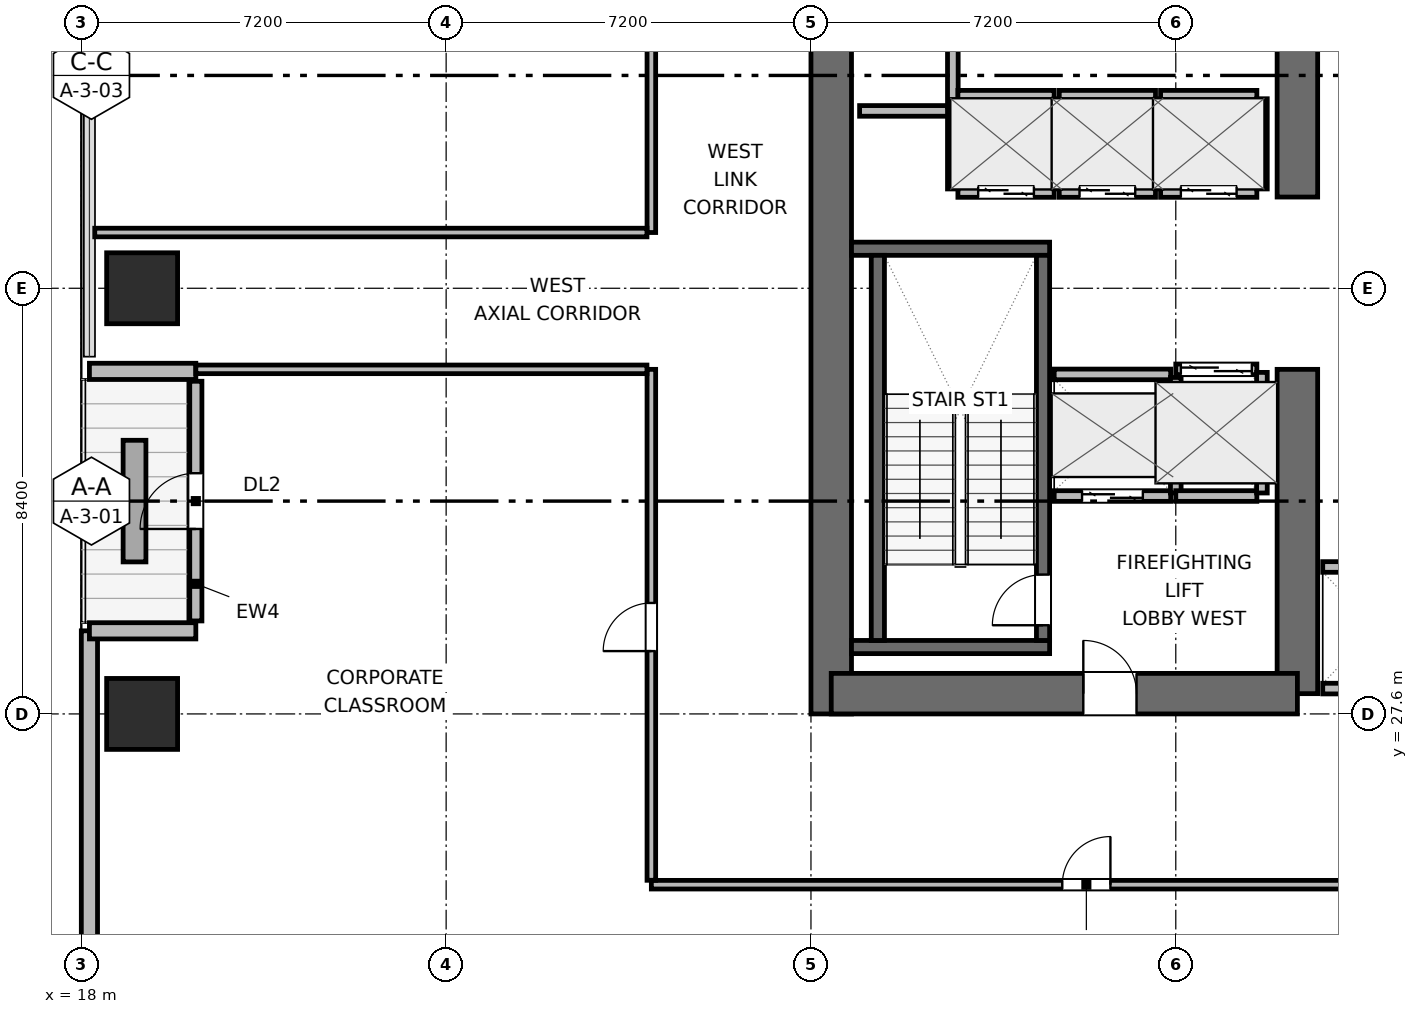
"""IFC4 building model, lengths in metres.
Left out: names, types, materials, properties, quantities, classifications, styles, units other than length and angle.
Written with IfcOpenShell. Run it as: python <this file> out.ifc"""

import sys

from ifc_helpers import new_model, si_unit, direction, frame, frame_2d, origin, origin_2d, place, context, subcontext, project, spatial, rectangle, extrude, element, fill, save


model = new_model("IFC4")
c1 = context("Model", 3, precision=1e-05, world=origin(), true_north=direction((0.0, 1.0)))
c2 = subcontext(c1, "Body", "Model", "MODEL_VIEW")
j1 = project(units=[si_unit("LENGTHUNIT", "METRE"), si_unit("PLANEANGLEUNIT", "RADIAN")], contexts=[c1])
p1 = place(None, origin())
s1 = spatial("IfcSite", under=j1, at=p1, CompositionType="ELEMENT")
p2 = place(p1, origin())
s2 = spatial("IfcBuilding", under=s1, at=p2, CompositionType="ELEMENT")
p3 = place(p2, frame((0.0, 0.0, 120.9)))
s3 = spatial("IfcBuildingStorey", under=s2, at=p3, CompositionType="ELEMENT", Elevation=120.9)
p4 = place(p3, frame((32.8, 27.6, 0.0), z_axis=(0.0, 0.0, 1.0), x_axis=(0.0, 1.0, 0.0)))
e1 = element("IfcWall", 1, at=p4, inside=s3, PredefinedType="SHEAR", context=c2, shape_type="SweptSolid", body=[
    extrude(rectangle(XDim=16.8, YDim=0.8, at=frame_2d((8.4, 0.0))), origin(), (0.0, 0.0, 1.0), 4.5),
])
p5 = place(p3, frame((42.0, 28.0, 0.0), z_axis=(0.0, 0.0, 1.0), x_axis=(0.0, 1.0, 0.0)))
e2 = element("IfcWall", 2, at=p5, inside=s3, PredefinedType="SHEAR", context=c2, shape_type="SweptSolid", body=[
    extrude(rectangle(XDim=6.4, YDim=0.8, at=frame_2d((3.2, 0.0))), origin(), (0.0, 0.0, 1.0), 4.5),
])
p6 = place(p3, frame((42.0, 37.8, 0.0), z_axis=(0.0, 0.0, 1.0), x_axis=(0.0, 1.0, 0.0)))
e3 = element("IfcWall", 3, at=p6, inside=s3, PredefinedType="SHEAR", context=c2, shape_type="SweptSolid", body=[
    extrude(rectangle(XDim=6.2, YDim=0.8, at=frame_2d((3.1, 0.0))), origin(), (0.0, 0.0, 1.0), 4.5),
])
p7 = place(p3, frame((32.8, 28.0, 0.0), z_axis=(0.0, 0.0, 1.0), x_axis=(1.0, 0.0, 0.0)))
e4 = element("IfcWall", 4, at=p7, inside=s3, PredefinedType="SHEAR", context=c2, shape_type="SweptSolid", body=[
    extrude(rectangle(XDim=9.2, YDim=0.8, at=frame_2d((4.6, 0.0))), origin(), (0.0, 0.0, 1.0), 4.5),
])
p8 = place(p7, frame((4.975, 0.0, 0.0)))
e5 = element("IfcOpeningElement", 5, at=p8, cuts=e4, PredefinedType="OPENING", context=c2, shape_type="SweptSolid", body=[
    extrude(rectangle(XDim=1.05, YDim=2.04, at=frame_2d((0.525, 1.02))), frame((0.0, 0.41, 0.0), z_axis=(0.0, -1.0, 0.0), x_axis=(1.0, 0.0, 0.0)), (0.0, 0.0, 1.0), 0.82),
])
for number, where, z_axis, x_axis in (
    (6, (33.2, 28.92, 0.0), (0.0, 0.0, 1.0), (1.0, 0.0, 0.0)),
    (7, (33.2, 36.78, 0.0), (0.0, 0.0, 1.0), (1.0, 0.0, 0.0)),
):
    element("IfcWall", number, at=place(p3, frame(where, z_axis=z_axis, x_axis=x_axis)), inside=s3, PredefinedType="SHEAR", context=c2, shape_type="SweptSolid", body=[
        extrude(rectangle(XDim=3.91, YDim=0.26, at=frame_2d((1.955, 0.0))), origin(), (0.0, 0.0, 1.0), 4.5),
    ])
p9 = place(p3, frame((33.72, 29.05, 0.0), z_axis=(0.0, 0.0, 1.0), x_axis=(0.0, 1.0, 0.0)))
e8 = element("IfcWall", 8, at=p9, inside=s3, PredefinedType="SHEAR", context=c2, shape_type="SweptSolid", body=[
    extrude(rectangle(XDim=7.6, YDim=0.26, at=frame_2d((3.8, 0.0))), origin(), (0.0, 0.0, 1.0), 4.5),
])
p10 = place(p3, frame((36.98, 29.05, 0.0), z_axis=(0.0, 0.0, 1.0), x_axis=(0.0, 1.0, 0.0)))
e9 = element("IfcWall", 9, at=p10, inside=s3, PredefinedType="SHEAR", context=c2, shape_type="SweptSolid", body=[
    extrude(rectangle(XDim=7.6, YDim=0.26, at=frame_2d((3.8, 0.0))), origin(), (0.0, 0.0, 1.0), 4.5),
])
p11 = place(p10, frame((0.3, 0.0, 0.0)))
e10 = element("IfcOpeningElement", 10, at=p11, cuts=e9, PredefinedType="OPENING", context=c2, shape_type="SweptSolid", body=[
    extrude(rectangle(XDim=1.0, YDim=2.04, at=frame_2d((0.5, 1.02))), frame((0.0, 0.14, 0.0), z_axis=(0.0, -1.0, 0.0), x_axis=(1.0, 0.0, 0.0)), (0.0, 0.0, 1.0), 0.28),
])
for number, where, z_axis, x_axis in (
    (11, (19.2, 27.6, 0.0), (0.0, 0.0, 1.0), (1.0, 0.0, 0.0)),
    (12, (19.2, 36.0, 0.0), (0.0, 0.0, 1.0), (1.0, 0.0, 0.0)),
):
    element("IfcColumn", number, at=place(p3, frame(where, z_axis=z_axis, x_axis=x_axis)), inside=s3, PredefinedType="COLUMN", context=c2, shape_type="SweptSolid", body=[
        extrude(rectangle(XDim=1.4, YDim=1.4, at=origin_2d()), origin(), (0.0, 0.0, 1.0), 4.5),
    ])
p12 = place(p3, frame((18.16, 15.021, 0.0), z_axis=(0.0, 0.0, 1.0), x_axis=(0.0, 1.0, 0.0)))
e13 = element("IfcWall", 13, at=p12, inside=s3, PredefinedType="SOLIDWALL", context=c2, shape_type="SweptSolid", body=[
    extrude(rectangle(XDim=14.219, YDim=0.32, at=frame_2d((7.109, 0.0))), origin(), (0.0, 0.0, 1.0), 4.24),
])
p13 = place(p3, frame((18.16, 29.24, 0.0), z_axis=(0.0, 0.0, 1.0), x_axis=(1.0, 0.0, 0.0)))
e14 = element("IfcWall", 14, at=p13, inside=s3, PredefinedType="SOLIDWALL", context=c2, shape_type="SweptSolid", body=[
    extrude(rectangle(XDim=2.1, YDim=0.32, at=frame_2d((1.05, 0.0))), origin(), (0.0, 0.0, 1.0), 3.475),
])
p14 = place(p3, frame((20.26, 29.435, 0.0), z_axis=(0.0, 0.0, 1.0), x_axis=(0.0, 1.0, 0.0)))
e15 = element("IfcWall", 15, at=p14, inside=s3, PredefinedType="SOLIDWALL", context=c2, shape_type="SweptSolid", body=[
    extrude(rectangle(XDim=4.73, YDim=0.24, at=frame_2d((2.365, 0.0))), origin(), (0.0, 0.0, 1.0), 3.762),
])
p15 = place(p14, frame((1.815, 0.0, 0.0)))
e16 = element("IfcOpeningElement", 16, at=p15, cuts=e15, PredefinedType="OPENING", context=c2, shape_type="SweptSolid", body=[
    extrude(rectangle(XDim=1.1, YDim=2.04, at=frame_2d((0.55, 1.02))), frame((0.0, 0.13, 0.0), z_axis=(0.0, -1.0, 0.0), x_axis=(1.0, 0.0, 0.0)), (0.0, 0.0, 1.0), 0.26),
])
p16 = place(p3, frame((20.26, 34.36, 0.0), z_axis=(0.0, 0.0, 1.0), x_axis=(-1.0, 0.0, 0.0)))
e17 = element("IfcWall", 17, at=p16, inside=s3, PredefinedType="SOLIDWALL", context=c2, shape_type="SweptSolid", body=[
    extrude(rectangle(XDim=2.1, YDim=0.32, at=frame_2d((1.05, 0.0))), origin(), (0.0, 0.0, 1.0), 3.475),
])
p17 = place(p3, frame((33.36, 39.5, 0.0), z_axis=(0.0, 0.0, 1.0), x_axis=(1.0, 0.0, 0.0)))
e18 = element("IfcWall", 18, at=p17, inside=s3, PredefinedType="PARTITIONING", context=c2, shape_type="SweptSolid", body=[
    extrude(rectangle(XDim=1.86, YDim=0.21, at=frame_2d((0.93, 0.0))), origin(), (0.0, 0.0, 1.0), 4.24),
])
p18 = place(p3, frame((35.2, 39.58, 0.0), z_axis=(0.0, 0.0, 1.0), x_axis=(0.0, 1.0, 0.0)))
e19 = element("IfcWall", 19, at=p18, inside=s3, PredefinedType="PARTITIONING", context=c2, shape_type="SweptSolid", body=[
    extrude(rectangle(XDim=1.32, YDim=0.21, at=frame_2d((0.66, 0.0))), origin(), (0.0, 0.0, 1.0), 4.24),
])
p19 = place(p3, frame((37.2, 31.9, 0.0), z_axis=(0.0, 0.0, 1.0), x_axis=(1.0, 0.0, 0.0)))
e20 = element("IfcWall", 20, at=p19, inside=s3, PredefinedType="PARTITIONING", context=c2, shape_type="SweptSolid", body=[
    extrude(rectangle(XDim=2.3, YDim=0.21, at=frame_2d((1.15, 0.0))), origin(), (0.0, 0.0, 1.0), 4.24),
])
p20 = place(p19, frame((0.55, 0.0, 0.0)))
e21 = element("IfcOpeningElement", 21, at=p20, cuts=e20, PredefinedType="OPENING", context=c2, shape_type="SweptSolid", body=[
    extrude(rectangle(XDim=1.2, YDim=2.04, at=frame_2d((0.6, 1.02))), frame((0.0, 0.115, 0.0), z_axis=(0.0, -1.0, 0.0), x_axis=(1.0, 0.0, 0.0)), (0.0, 0.0, 1.0), 0.23),
])
p21 = place(p3, frame((37.2, 34.3, 0.0), z_axis=(0.0, 0.0, 1.0), x_axis=(1.0, 0.0, 0.0)))
e22 = element("IfcWall", 22, at=p21, inside=s3, PredefinedType="PARTITIONING", context=c2, shape_type="SweptSolid", body=[
    extrude(rectangle(XDim=2.3, YDim=0.21, at=frame_2d((1.15, 0.0))), origin(), (0.0, 0.0, 1.0), 4.24),
])
p22 = place(p3, frame((39.6, 31.96, 0.0), z_axis=(0.0, 0.0, 1.0), x_axis=(0.0, 1.0, 0.0)))
e23 = element("IfcWall", 23, at=p22, inside=s3, PredefinedType="PARTITIONING", context=c2, shape_type="SweptSolid", body=[
    extrude(rectangle(XDim=2.28, YDim=0.21, at=frame_2d((1.14, 0.0))), origin(), (0.0, 0.0, 1.0), 4.24),
])
p23 = place(p3, frame((39.6, 34.4, 0.0), z_axis=(0.0, 0.0, 1.0), x_axis=(1.0, 0.0, 0.0)))
e24 = element("IfcWall", 24, at=p23, inside=s3, PredefinedType="PARTITIONING", context=c2, shape_type="SweptSolid", body=[
    extrude(rectangle(XDim=1.6, YDim=0.21, at=frame_2d((0.8, 0.0))), origin(), (0.0, 0.0, 1.0), 4.24),
])
p24 = place(p23, frame((0.1, 0.0, 0.0)))
e25 = element("IfcOpeningElement", 25, at=p24, cuts=e24, PredefinedType="OPENING", context=c2, shape_type="SweptSolid", body=[
    extrude(rectangle(XDim=1.4, YDim=2.06, at=frame_2d((0.7, 1.03))), frame((0.0, 0.115, 0.0), z_axis=(0.0, -1.0, 0.0), x_axis=(1.0, 0.0, 0.0)), (0.0, 0.0, 1.0), 0.23),
])
p25 = place(p3, frame((39.6, 31.9, 0.0), z_axis=(0.0, 0.0, 1.0), x_axis=(1.0, 0.0, 0.0)))
e26 = element("IfcWall", 26, at=p25, inside=s3, PredefinedType="PARTITIONING", context=c2, shape_type="SweptSolid", body=[
    extrude(rectangle(XDim=1.6, YDim=0.21, at=frame_2d((0.8, 0.0))), origin(), (0.0, 0.0, 1.0), 4.24),
])
p26 = place(p3, frame((41.3, 31.96, 0.0), z_axis=(0.0, 0.0, 1.0), x_axis=(0.0, 1.0, 0.0)))
e27 = element("IfcWall", 27, at=p26, inside=s3, PredefinedType="PARTITIONING", context=c2, shape_type="SweptSolid", body=[
    extrude(rectangle(XDim=2.38, YDim=0.21, at=frame_2d((1.19, 0.0))), origin(), (0.0, 0.0, 1.0), 4.24),
])
p27 = place(p3, frame((42.5, 30.5, 0.0), z_axis=(0.0, 0.0, 1.0), x_axis=(1.0, 0.0, 0.0)))
e28 = element("IfcWall", 28, at=p27, inside=s3, PredefinedType="PARTITIONING", context=c2, shape_type="SweptSolid", body=[
    extrude(rectangle(XDim=2.1, YDim=0.21, at=frame_2d((1.05, 0.0))), origin(), (0.0, 0.0, 1.0), 4.24),
])
p28 = place(p3, frame((42.5, 28.1, 0.0), z_axis=(0.0, 0.0, 1.0), x_axis=(1.0, 0.0, 0.0)))
e29 = element("IfcWall", 29, at=p28, inside=s3, PredefinedType="PARTITIONING", context=c2, shape_type="SweptSolid", body=[
    extrude(rectangle(XDim=2.1, YDim=0.21, at=frame_2d((1.05, 0.0))), origin(), (0.0, 0.0, 1.0), 3.125),
])
p29 = place(p3, frame((35.3, 37.9, 0.0), z_axis=(0.0, 0.0, 1.0), x_axis=(1.0, 0.0, 0.0)))
e30 = element("IfcWall", 30, at=p29, inside=s3, PredefinedType="PARTITIONING", context=c2, shape_type="SweptSolid", body=[
    extrude(rectangle(XDim=1.9, YDim=0.21, at=frame_2d((0.95, 0.0))), origin(), (0.0, 0.0, 1.0), 4.24),
])
p30 = place(p29, frame((0.4, 0.0, 0.0)))
e31 = element("IfcOpeningElement", 31, at=p30, cuts=e30, PredefinedType="OPENING", context=c2, shape_type="SweptSolid", body=[
    extrude(rectangle(XDim=1.1, YDim=2.04, at=frame_2d((0.55, 1.02))), frame((0.0, 0.115, 0.0), z_axis=(0.0, -1.0, 0.0), x_axis=(1.0, 0.0, 0.0)), (0.0, 0.0, 1.0), 0.23),
])
p31 = place(p3, frame((35.3, 39.8, 0.0), z_axis=(0.0, 0.0, 1.0), x_axis=(1.0, 0.0, 0.0)))
e32 = element("IfcWall", 32, at=p31, inside=s3, PredefinedType="PARTITIONING", context=c2, shape_type="SweptSolid", body=[
    extrude(rectangle(XDim=1.9, YDim=0.21, at=frame_2d((0.95, 0.0))), origin(), (0.0, 0.0, 1.0), 4.24),
])
p32 = place(p3, frame((35.2, 37.96, 0.0), z_axis=(0.0, 0.0, 1.0), x_axis=(0.0, 1.0, 0.0)))
e33 = element("IfcWall", 33, at=p32, inside=s3, PredefinedType="PARTITIONING", context=c2, shape_type="SweptSolid", body=[
    extrude(rectangle(XDim=1.62, YDim=0.21, at=frame_2d((0.81, 0.0))), origin(), (0.0, 0.0, 1.0), 4.24),
])
p33 = place(p3, frame((37.3, 37.96, 0.0), z_axis=(0.0, 0.0, 1.0), x_axis=(0.0, 1.0, 0.0)))
e34 = element("IfcWall", 34, at=p33, inside=s3, PredefinedType="PARTITIONING", context=c2, shape_type="SweptSolid", body=[
    extrude(rectangle(XDim=1.78, YDim=0.21, at=frame_2d((0.89, 0.0))), origin(), (0.0, 0.0, 1.0), 4.24),
])
p34 = place(p3, frame((37.3, 37.9, 0.0), z_axis=(0.0, 0.0, 1.0), x_axis=(1.0, 0.0, 0.0)))
e35 = element("IfcWall", 35, at=p34, inside=s3, PredefinedType="PARTITIONING", context=c2, shape_type="SweptSolid", body=[
    extrude(rectangle(XDim=1.9, YDim=0.21, at=frame_2d((0.95, 0.0))), origin(), (0.0, 0.0, 1.0), 4.24),
])
p35 = place(p34, frame((0.4, 0.0, 0.0)))
e36 = element("IfcOpeningElement", 36, at=p35, cuts=e35, PredefinedType="OPENING", context=c2, shape_type="SweptSolid", body=[
    extrude(rectangle(XDim=1.1, YDim=2.04, at=frame_2d((0.55, 1.02))), frame((0.0, 0.115, 0.0), z_axis=(0.0, -1.0, 0.0), x_axis=(1.0, 0.0, 0.0)), (0.0, 0.0, 1.0), 0.23),
])
p36 = place(p3, frame((37.3, 39.8, 0.0), z_axis=(0.0, 0.0, 1.0), x_axis=(1.0, 0.0, 0.0)))
e37 = element("IfcWall", 37, at=p36, inside=s3, PredefinedType="PARTITIONING", context=c2, shape_type="SweptSolid", body=[
    extrude(rectangle(XDim=1.9, YDim=0.21, at=frame_2d((0.95, 0.0))), origin(), (0.0, 0.0, 1.0), 4.24),
])
p37 = place(p3, frame((39.3, 37.96, 0.0), z_axis=(0.0, 0.0, 1.0), x_axis=(0.0, 1.0, 0.0)))
e38 = element("IfcWall", 38, at=p37, inside=s3, PredefinedType="PARTITIONING", context=c2, shape_type="SweptSolid", body=[
    extrude(rectangle(XDim=1.78, YDim=0.21, at=frame_2d((0.89, 0.0))), origin(), (0.0, 0.0, 1.0), 4.24),
])
p38 = place(p3, frame((39.3, 37.9, 0.0), z_axis=(0.0, 0.0, 1.0), x_axis=(1.0, 0.0, 0.0)))
e39 = element("IfcWall", 39, at=p38, inside=s3, PredefinedType="PARTITIONING", context=c2, shape_type="SweptSolid", body=[
    extrude(rectangle(XDim=1.9, YDim=0.21, at=frame_2d((0.95, 0.0))), origin(), (0.0, 0.0, 1.0), 4.24),
])
p39 = place(p38, frame((0.4, 0.0, 0.0)))
e40 = element("IfcOpeningElement", 40, at=p39, cuts=e39, PredefinedType="OPENING", context=c2, shape_type="SweptSolid", body=[
    extrude(rectangle(XDim=1.1, YDim=2.04, at=frame_2d((0.55, 1.02))), frame((0.0, 0.115, 0.0), z_axis=(0.0, -1.0, 0.0), x_axis=(1.0, 0.0, 0.0)), (0.0, 0.0, 1.0), 0.23),
])
p40 = place(p3, frame((39.3, 39.8, 0.0), z_axis=(0.0, 0.0, 1.0), x_axis=(1.0, 0.0, 0.0)))
e41 = element("IfcWall", 41, at=p40, inside=s3, PredefinedType="PARTITIONING", context=c2, shape_type="SweptSolid", body=[
    extrude(rectangle(XDim=1.9, YDim=0.21, at=frame_2d((0.95, 0.0))), origin(), (0.0, 0.0, 1.0), 4.24),
])
p41 = place(p3, frame((41.3, 37.96, 0.0), z_axis=(0.0, 0.0, 1.0), x_axis=(0.0, 1.0, 0.0)))
e42 = element("IfcWall", 42, at=p41, inside=s3, PredefinedType="PARTITIONING", context=c2, shape_type="SweptSolid", body=[
    extrude(rectangle(XDim=1.78, YDim=0.21, at=frame_2d((0.89, 0.0))), origin(), (0.0, 0.0, 1.0), 4.24),
])
p42 = place(p3, frame((29.25, 24.23, 0.0), z_axis=(0.0, 0.0, 1.0), x_axis=(1.0, 0.0, 0.0)))
e43 = element("IfcWall", 43, at=p42, inside=s3, PredefinedType="PARTITIONING", context=c2, shape_type="SweptSolid", body=[
    extrude(rectangle(XDim=34.35, YDim=0.17, at=frame_2d((17.175, 0.0))), origin(), (0.0, 0.0, 1.0), 4.24),
])
p43 = place(p42, frame((8.11, 0.0, 0.0)))
e44 = element("IfcOpeningElement", 44, at=p43, cuts=e43, PredefinedType="OPENING", context=c2, shape_type="SweptSolid", body=[
    extrude(rectangle(XDim=0.95, YDim=2.04, at=frame_2d((0.475, 1.02))), frame((0.0, 0.095, 0.0), z_axis=(0.0, -1.0, 0.0), x_axis=(1.0, 0.0, 0.0)), (0.0, 0.0, 1.0), 0.19),
])
p44 = place(p42, frame((25.285, 0.0, 0.0)))
e45 = element("IfcOpeningElement", 45, at=p44, cuts=e43, PredefinedType="OPENING", context=c2, shape_type="SweptSolid", body=[
    extrude(rectangle(XDim=0.95, YDim=2.04, at=frame_2d((0.475, 1.02))), frame((0.0, 0.095, 0.0), z_axis=(0.0, -1.0, 0.0), x_axis=(1.0, 0.0, 0.0)), (0.0, 0.0, 1.0), 0.19),
])
p45 = place(p3, frame((29.25, 24.317, 0.0), z_axis=(0.0, 0.0, 1.0), x_axis=(0.0, 1.0, 0.0)))
e46 = element("IfcWall", 46, at=p45, inside=s3, PredefinedType="PARTITIONING", context=c2, shape_type="SweptSolid", body=[
    extrude(rectangle(XDim=10.083, YDim=0.17, at=frame_2d((5.042, 0.0))), origin(), (0.0, 0.0, 1.0), 4.24),
])
p46 = place(p45, frame((4.523, 0.0, 0.0)))
e47 = element("IfcOpeningElement", 47, at=p46, cuts=e46, PredefinedType="OPENING", context=c2, shape_type="SweptSolid", body=[
    extrude(rectangle(XDim=0.95, YDim=2.04, at=frame_2d((0.475, 1.02))), frame((0.0, 0.095, 0.0), z_axis=(0.0, -1.0, 0.0), x_axis=(1.0, 0.0, 0.0)), (0.0, 0.0, 1.0), 0.19),
])
p47 = place(p3, frame((29.25, 37.1, 0.0), z_axis=(0.0, 0.0, 1.0), x_axis=(0.0, 1.0, 0.0)))
e48 = element("IfcWall", 48, at=p47, inside=s3, PredefinedType="PARTITIONING", context=c2, shape_type="SweptSolid", body=[
    extrude(rectangle(XDim=10.583, YDim=0.17, at=frame_2d((5.292, 0.0))), origin(), (0.0, 0.0, 1.0), 4.24),
])
p48 = place(p47, frame((4.86, 0.0, 0.0)))
e49 = element("IfcOpeningElement", 49, at=p48, cuts=e48, PredefinedType="OPENING", context=c2, shape_type="SweptSolid", body=[
    extrude(rectangle(XDim=0.95, YDim=2.04, at=frame_2d((0.475, 1.02))), frame((0.0, 0.095, 0.0), z_axis=(0.0, -1.0, 0.0), x_axis=(1.0, 0.0, 0.0)), (0.0, 0.0, 1.0), 0.19),
])
p49 = place(p3, frame((20.26, 34.4, 0.0), z_axis=(0.0, 0.0, 1.0), x_axis=(1.0, 0.0, 0.0)))
e50 = element("IfcWall", 50, at=p49, inside=s3, PredefinedType="PARTITIONING", context=c2, shape_type="SweptSolid", body=[
    extrude(rectangle(XDim=8.903, YDim=0.17, at=frame_2d((4.452, 0.0))), origin(), (0.0, 0.0, 1.0), 4.24),
])
p50 = place(p3, frame((18.265, 37.1, 0.0), z_axis=(0.0, 0.0, 1.0), x_axis=(1.0, 0.0, 0.0)))
e51 = element("IfcWall", 51, at=p50, inside=s3, PredefinedType="PARTITIONING", context=c2, shape_type="SweptSolid", body=[
    extrude(rectangle(XDim=10.898, YDim=0.17, at=frame_2d((5.449, 0.0))), origin(), (0.0, 0.0, 1.0), 4.24),
])
p51 = place(p15, origin())
e52 = element("IfcDoor", 52, at=p51, inside=s3, OperationType="SINGLE_SWING_LEFT", PredefinedType="DOOR", context=c2, shape_type="SweptSolid", body=[
    extrude(rectangle(XDim=1.1, YDim=2.04, at=frame_2d((0.55, 1.02))), frame((0.0, 0.025, 0.0), z_axis=(0.0, -1.0, 0.0), x_axis=(1.0, 0.0, 0.0)), (0.0, 0.0, 1.0), 0.05),
])
fill(e16, e52)
p52 = place(p11, origin())
e53 = element("IfcDoor", 53, at=p52, inside=s3, OperationType="SINGLE_SWING_LEFT", PredefinedType="DOOR", context=c2, shape_type="SweptSolid", body=[
    extrude(rectangle(XDim=1.0, YDim=2.04, at=frame_2d((0.5, 1.02))), frame((0.0, 0.025, 0.0), z_axis=(0.0, -1.0, 0.0), x_axis=(1.0, 0.0, 0.0)), (0.0, 0.0, 1.0), 0.05),
])
fill(e10, e53)
p53 = place(p20, origin())
e54 = element("IfcDoor", 54, at=p53, inside=s3, OperationType="DOUBLE_DOOR_SLIDING", PredefinedType="DOOR", context=c2, shape_type="SweptSolid", body=[
    extrude(rectangle(XDim=1.2, YDim=2.04, at=frame_2d((0.6, 1.02))), frame((0.0, 0.025, 0.0), z_axis=(0.0, -1.0, 0.0), x_axis=(1.0, 0.0, 0.0)), (0.0, 0.0, 1.0), 0.05),
])
fill(e21, e54)
p54 = place(p24, origin())
e55 = element("IfcDoor", 55, at=p54, inside=s3, OperationType="DOUBLE_DOOR_SLIDING", PredefinedType="DOOR", context=c2, shape_type="SweptSolid", body=[
    extrude(rectangle(XDim=1.4, YDim=2.06, at=frame_2d((0.7, 1.03))), frame((0.0, 0.025, 0.0), z_axis=(0.0, -1.0, 0.0), x_axis=(1.0, 0.0, 0.0)), (0.0, 0.0, 1.0), 0.05),
])
fill(e25, e55)
p55 = place(p30, origin())
e56 = element("IfcDoor", 56, at=p55, inside=s3, OperationType="DOUBLE_DOOR_SLIDING", PredefinedType="DOOR", context=c2, shape_type="SweptSolid", body=[
    extrude(rectangle(XDim=1.1, YDim=2.04, at=frame_2d((0.55, 1.02))), frame((0.0, 0.025, 0.0), z_axis=(0.0, -1.0, 0.0), x_axis=(1.0, 0.0, 0.0)), (0.0, 0.0, 1.0), 0.05),
])
fill(e31, e56)
p56 = place(p35, origin())
e57 = element("IfcDoor", 57, at=p56, inside=s3, OperationType="DOUBLE_DOOR_SLIDING", PredefinedType="DOOR", context=c2, shape_type="SweptSolid", body=[
    extrude(rectangle(XDim=1.1, YDim=2.04, at=frame_2d((0.55, 1.02))), frame((0.0, 0.025, 0.0), z_axis=(0.0, -1.0, 0.0), x_axis=(1.0, 0.0, 0.0)), (0.0, 0.0, 1.0), 0.05),
])
fill(e36, e57)
p57 = place(p39, origin())
e58 = element("IfcDoor", 58, at=p57, inside=s3, OperationType="DOUBLE_DOOR_SLIDING", PredefinedType="DOOR", context=c2, shape_type="SweptSolid", body=[
    extrude(rectangle(XDim=1.1, YDim=2.04, at=frame_2d((0.55, 1.02))), frame((0.0, 0.025, 0.0), z_axis=(0.0, -1.0, 0.0), x_axis=(1.0, 0.0, 0.0)), (0.0, 0.0, 1.0), 0.05),
])
fill(e40, e58)
p58 = place(p8, origin())
e59 = element("IfcDoor", 59, at=p58, inside=s3, OperationType="SINGLE_SWING_LEFT", PredefinedType="DOOR", context=c2, shape_type="SweptSolid", body=[
    extrude(rectangle(XDim=1.05, YDim=2.04, at=frame_2d((0.525, 1.02))), frame((0.0, 0.025, 0.0), z_axis=(0.0, -1.0, 0.0), x_axis=(1.0, 0.0, 0.0)), (0.0, 0.0, 1.0), 0.05),
])
fill(e5, e59)
p59 = place(p43, origin())
e60 = element("IfcDoor", 60, at=p59, inside=s3, OperationType="SINGLE_SWING_RIGHT", PredefinedType="DOOR", context=c2, shape_type="SweptSolid", body=[
    extrude(rectangle(XDim=0.95, YDim=2.04, at=frame_2d((0.475, 1.02))), frame((0.0, 0.025, 0.0), z_axis=(0.0, -1.0, 0.0), x_axis=(1.0, 0.0, 0.0)), (0.0, 0.0, 1.0), 0.05),
])
fill(e44, e60)
p60 = place(p46, origin())
e61 = element("IfcDoor", 61, at=p60, inside=s3, OperationType="SINGLE_SWING_LEFT", PredefinedType="DOOR", context=c2, shape_type="SweptSolid", body=[
    extrude(rectangle(XDim=0.95, YDim=2.04, at=frame_2d((0.475, 1.02))), frame((0.0, 0.025, 0.0), z_axis=(0.0, -1.0, 0.0), x_axis=(1.0, 0.0, 0.0)), (0.0, 0.0, 1.0), 0.05),
])
fill(e47, e61)
save(model, sys.argv[1])
